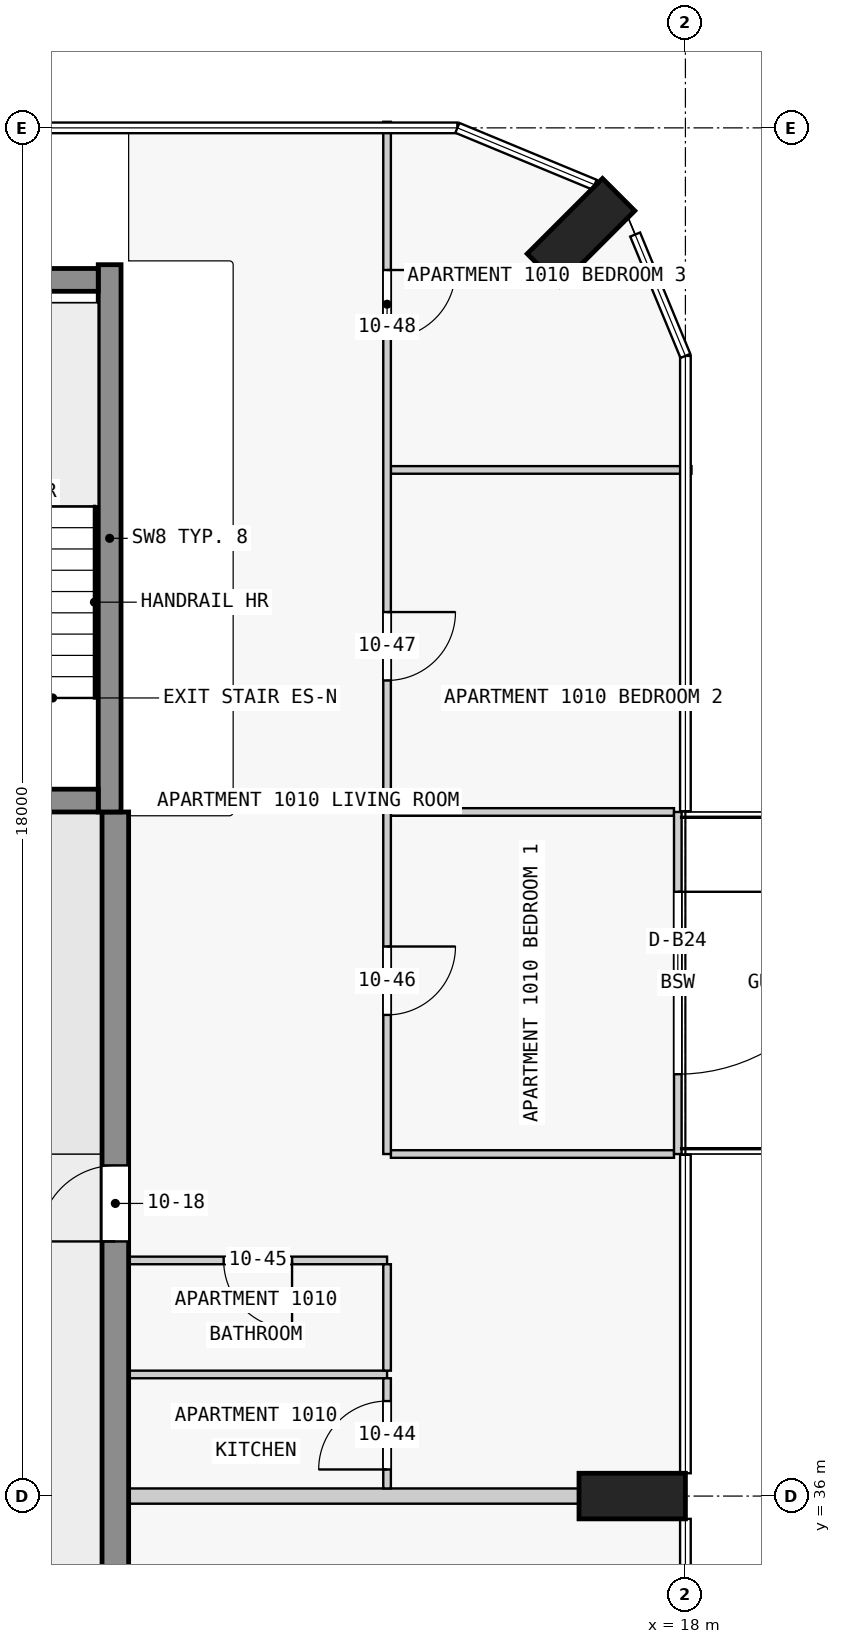
"""IFC4 building model, lengths in metres.
Left out: names, types, materials, properties, quantities, classifications, styles, units other than length and angle.
Written with IfcOpenShell. Run it as: python <this file> out.ifc"""

import sys

from ifc_helpers import new_model, si_unit, direction, frame, frame_2d, origin, origin_2d, place, context, subcontext, project, spatial, rectangle, extrude, element, fill, save


model = new_model("IFC4")
c1 = context("Model", 3, precision=1e-05, world=origin(), true_north=direction((0.0, 1.0)))
c2 = subcontext(c1, "Body", "Model", "MODEL_VIEW")
j1 = project(units=[si_unit("LENGTHUNIT", "METRE"), si_unit("PLANEANGLEUNIT", "RADIAN")], contexts=[c1])
p1 = place(None, origin())
s1 = spatial("IfcSite", under=j1, at=p1, CompositionType="ELEMENT")
p2 = place(p1, origin())
s2 = spatial("IfcBuilding", under=s1, at=p2, CompositionType="ELEMENT")
p3 = place(p2, frame((0.0, 0.0, 44.3)))
s3 = spatial("IfcBuildingStorey", under=s2, at=p3, CompositionType="ELEMENT", Elevation=44.3)
for number, where, z_axis, x_axis in (
    (1, (17.3, 36.0, 0.0), (0.0, 0.0, 1.0), (0.0, 1.0, 0.0)),
    (2, (16.626, 52.626, 0.0), (0.0, 0.0, 1.0), (-0.707, 0.707, 0.0)),
):
    element("IfcColumn", number, at=place(p3, frame(where, z_axis=z_axis, x_axis=x_axis)), inside=s3, PredefinedType="COLUMN", context=c2, shape_type="SweptSolid", body=[
        extrude(rectangle(XDim=0.6, YDim=1.4, at=origin_2d()), origin(), (0.0, 0.0, 1.0), 3.5),
    ])
p4 = place(p3, frame((7.725, 45.15, 0.0), z_axis=(0.0, 0.0, 1.0), x_axis=(1.0, 0.0, 0.0)))
e3 = element("IfcWall", 3, at=p4, inside=s3, PredefinedType="SHEAR", context=c2, shape_type="SweptSolid", body=[
    extrude(rectangle(XDim=2.55, YDim=0.3, at=frame_2d((1.275, 0.0))), origin(), (0.0, 0.0, 1.0), 3.5),
])
p5 = place(p4, frame((0.725, 0.0, 0.0)))
e4 = element("IfcOpeningElement", 4, at=p5, cuts=e3, PredefinedType="OPENING", context=c2, shape_type="SweptSolid", body=[
    extrude(rectangle(XDim=1.1, YDim=2.1, at=frame_2d((0.55, 1.05))), frame((0.0, 0.16, 0.0), z_axis=(0.0, -1.0, 0.0), x_axis=(1.0, 0.0, 0.0)), (0.0, 0.0, 1.0), 0.32),
])
p6 = place(p3, frame((7.725, 52.0, 0.0), z_axis=(0.0, 0.0, 1.0), x_axis=(1.0, 0.0, 0.0)))
e5 = element("IfcWall", 5, at=p6, inside=s3, PredefinedType="SHEAR", context=c2, shape_type="SweptSolid", body=[
    extrude(rectangle(XDim=2.55, YDim=0.3, at=frame_2d((1.275, 0.0))), origin(), (0.0, 0.0, 1.0), 3.5),
])
p7 = place(p3, frame((10.425, 45.0, 0.0), z_axis=(0.0, 0.0, 1.0), x_axis=(0.0, 1.0, 0.0)))
e6 = element("IfcWall", 6, at=p7, inside=s3, PredefinedType="SHEAR", context=c2, shape_type="SweptSolid", body=[
    extrude(rectangle(XDim=7.2, YDim=0.3, at=frame_2d((3.6, 0.0))), origin(), (0.0, 0.0, 1.0), 3.5),
])
p8 = place(p3, frame((10.5, 18.0, 0.0), z_axis=(0.0, 0.0, 1.0), x_axis=(0.0, 1.0, 0.0)))
e7 = element("IfcWall", 7, at=p8, inside=s3, PredefinedType="SHEAR", context=c2, shape_type="SweptSolid", body=[
    extrude(rectangle(XDim=27.0, YDim=0.35, at=frame_2d((13.5, 0.0))), origin(), (0.0, 0.0, 1.0), 3.25),
])
p9 = place(p8, frame((1.75, 0.0, 0.0)))
e8 = element("IfcOpeningElement", 8, at=p9, cuts=e7, PredefinedType="OPENING", context=c2, shape_type="SweptSolid", body=[
    extrude(rectangle(XDim=1.0, YDim=2.1, at=frame_2d((0.5, 1.05))), frame((0.0, 0.185, 0.0), z_axis=(0.0, -1.0, 0.0), x_axis=(1.0, 0.0, 0.0)), (0.0, 0.0, 1.0), 0.37),
])
p10 = place(p8, frame((6.25, 0.0, 0.0)))
e9 = element("IfcOpeningElement", 9, at=p10, cuts=e7, PredefinedType="OPENING", context=c2, shape_type="SweptSolid", body=[
    extrude(rectangle(XDim=1.0, YDim=2.1, at=frame_2d((0.5, 1.05))), frame((0.0, 0.185, 0.0), z_axis=(0.0, -1.0, 0.0), x_axis=(1.0, 0.0, 0.0)), (0.0, 0.0, 1.0), 0.37),
])
p11 = place(p8, frame((10.75, 0.0, 0.0)))
e10 = element("IfcOpeningElement", 10, at=p11, cuts=e7, PredefinedType="OPENING", context=c2, shape_type="SweptSolid", body=[
    extrude(rectangle(XDim=1.0, YDim=2.1, at=frame_2d((0.5, 1.05))), frame((0.0, 0.185, 0.0), z_axis=(0.0, -1.0, 0.0), x_axis=(1.0, 0.0, 0.0)), (0.0, 0.0, 1.0), 0.37),
])
p12 = place(p8, frame((15.25, 0.0, 0.0)))
e11 = element("IfcOpeningElement", 11, at=p12, cuts=e7, PredefinedType="OPENING", context=c2, shape_type="SweptSolid", body=[
    extrude(rectangle(XDim=1.0, YDim=2.1, at=frame_2d((0.5, 1.05))), frame((0.0, 0.185, 0.0), z_axis=(0.0, -1.0, 0.0), x_axis=(1.0, 0.0, 0.0)), (0.0, 0.0, 1.0), 0.37),
])
p13 = place(p8, frame((21.35, 0.0, 0.0)))
e12 = element("IfcOpeningElement", 12, at=p13, cuts=e7, PredefinedType="OPENING", context=c2, shape_type="SweptSolid", body=[
    extrude(rectangle(XDim=1.0, YDim=2.1, at=frame_2d((0.5, 1.05))), frame((0.0, 0.185, 0.0), z_axis=(0.0, -1.0, 0.0), x_axis=(1.0, 0.0, 0.0)), (0.0, 0.0, 1.0), 0.37),
])
p14 = place(p3, frame((17.9, 45.0, 0.0), z_axis=(0.0, 0.0, 1.0), x_axis=(0.0, -1.0, 0.0)))
e13 = element("IfcWall", 13, at=p14, inside=s3, PredefinedType="STANDARD", context=c2, shape_type="SweptSolid", body=[
    extrude(rectangle(XDim=4.5, YDim=0.1, at=frame_2d((2.25, 0.0))), origin(), (0.0, 0.0, 1.0), 3.25),
])
p15 = place(p14, frame((1.05, 0.0, 0.0)))
e14 = element("IfcOpeningElement", 14, at=p15, cuts=e13, PredefinedType="OPENING", context=c2, shape_type="SweptSolid", body=[
    extrude(rectangle(XDim=2.4, YDim=2.4, at=frame_2d((1.2, 1.2))), frame((0.0, 0.06, 0.0), z_axis=(0.0, -1.0, 0.0), x_axis=(1.0, 0.0, 0.0)), (0.0, 0.0, 1.0), 0.12),
])
p16 = place(p3, frame((16.6, 36.0, 0.0), z_axis=(0.0, 0.0, 1.0), x_axis=(-1.0, 0.0, 0.0)))
e15 = element("IfcWall", 15, at=p16, inside=s3, PredefinedType="PARTITIONING", context=c2, shape_type="SweptSolid", body=[
    extrude(rectangle(XDim=5.925, YDim=0.2, at=frame_2d((2.962, 0.0))), origin(), (0.0, 0.0, 1.0), 3.25),
])
p17 = place(p3, frame((14.075, 37.6, 0.0), z_axis=(0.0, 0.0, 1.0), x_axis=(-1.0, 0.0, 0.0)))
e16 = element("IfcWall", 16, at=p17, inside=s3, PredefinedType="PARTITIONING", context=c2, shape_type="SweptSolid", body=[
    extrude(rectangle(XDim=3.4, YDim=0.1, at=frame_2d((1.7, 0.0))), origin(), (0.0, 0.0, 1.0), 3.25),
])
p18 = place(p3, frame((14.075, 39.1, 0.0), z_axis=(0.0, 0.0, 1.0), x_axis=(-1.0, 0.0, 0.0)))
e17 = element("IfcWall", 17, at=p18, inside=s3, PredefinedType="PARTITIONING", context=c2, shape_type="SweptSolid", body=[
    extrude(rectangle(XDim=3.4, YDim=0.1, at=frame_2d((1.7, 0.0))), origin(), (0.0, 0.0, 1.0), 3.25),
])
p19 = place(p18, frame((1.25, 0.0, 0.0)))
e18 = element("IfcOpeningElement", 18, at=p19, cuts=e17, PredefinedType="OPENING", context=c2, shape_type="SweptSolid", body=[
    extrude(rectangle(XDim=0.9, YDim=2.1, at=frame_2d((0.45, 1.05))), frame((0.0, 0.06, 0.0), z_axis=(0.0, -1.0, 0.0), x_axis=(1.0, 0.0, 0.0)), (0.0, 0.0, 1.0), 0.12),
])
for number, where, z_axis, x_axis in (
    (19, (14.125, 40.5, 0.0), (0.0, 0.0, 1.0), (1.0, 0.0, 0.0)),
    (20, (17.85, 45.0, 0.0), (0.0, 0.0, 1.0), (-1.0, 0.0, 0.0)),
):
    element("IfcWall", number, at=place(p3, frame(where, z_axis=z_axis, x_axis=x_axis)), inside=s3, PredefinedType="PARTITIONING", context=c2, shape_type="SweptSolid", body=[
        extrude(rectangle(XDim=3.725, YDim=0.1, at=frame_2d((1.863, 0.0))), origin(), (0.0, 0.0, 1.0), 3.25),
    ])
p20 = place(p3, frame((18.08, 49.5, 0.0), z_axis=(0.0, 0.0, 1.0), x_axis=(-1.0, 0.0, 0.0)))
e21 = element("IfcWall", 21, at=p20, inside=s3, PredefinedType="PARTITIONING", context=c2, shape_type="SweptSolid", body=[
    extrude(rectangle(XDim=3.955, YDim=0.1, at=frame_2d((1.978, 0.0))), origin(), (0.0, 0.0, 1.0), 3.25),
])
p21 = place(p3, frame((14.075, 54.08, 0.0), z_axis=(0.0, 0.0, 1.0), x_axis=(0.0, -1.0, 0.0)))
e22 = element("IfcWall", 22, at=p21, inside=s3, PredefinedType="PARTITIONING", context=c2, shape_type="SweptSolid", body=[
    extrude(rectangle(XDim=13.58, YDim=0.1, at=frame_2d((6.79, 0.0))), origin(), (0.0, 0.0, 1.0), 3.25),
])
p22 = place(p21, frame((10.85, 0.0, 0.0)))
e23 = element("IfcOpeningElement", 23, at=p22, cuts=e22, PredefinedType="OPENING", context=c2, shape_type="SweptSolid", body=[
    extrude(rectangle(XDim=0.9, YDim=2.1, at=frame_2d((0.45, 1.05))), frame((0.0, 0.06, 0.0), z_axis=(0.0, -1.0, 0.0), x_axis=(1.0, 0.0, 0.0)), (0.0, 0.0, 1.0), 0.12),
])
p23 = place(p21, frame((6.45, 0.0, 0.0)))
e24 = element("IfcOpeningElement", 24, at=p23, cuts=e22, PredefinedType="OPENING", context=c2, shape_type="SweptSolid", body=[
    extrude(rectangle(XDim=0.9, YDim=2.1, at=frame_2d((0.45, 1.05))), frame((0.0, 0.06, 0.0), z_axis=(0.0, -1.0, 0.0), x_axis=(1.0, 0.0, 0.0)), (0.0, 0.0, 1.0), 0.12),
])
p24 = place(p21, frame((1.95, 0.0, 0.0)))
e25 = element("IfcOpeningElement", 25, at=p24, cuts=e22, PredefinedType="OPENING", context=c2, shape_type="SweptSolid", body=[
    extrude(rectangle(XDim=0.9, YDim=2.1, at=frame_2d((0.45, 1.05))), frame((0.0, 0.06, 0.0), z_axis=(0.0, -1.0, 0.0), x_axis=(1.0, 0.0, 0.0)), (0.0, 0.0, 1.0), 0.12),
])
p25 = place(p3, frame((14.075, 36.1, 0.0), z_axis=(0.0, 0.0, 1.0), x_axis=(0.0, 1.0, 0.0)))
e26 = element("IfcWall", 26, at=p25, inside=s3, PredefinedType="PARTITIONING", context=c2, shape_type="SweptSolid", body=[
    extrude(rectangle(XDim=1.45, YDim=0.1, at=frame_2d((0.725, 0.0))), origin(), (0.0, 0.0, 1.0), 3.25),
])
p26 = place(p25, frame((0.25, 0.0, 0.0)))
e27 = element("IfcOpeningElement", 27, at=p26, cuts=e26, PredefinedType="OPENING", context=c2, shape_type="SweptSolid", body=[
    extrude(rectangle(XDim=0.9, YDim=2.1, at=frame_2d((0.45, 1.05))), frame((0.0, 0.06, 0.0), z_axis=(0.0, -1.0, 0.0), x_axis=(1.0, 0.0, 0.0)), (0.0, 0.0, 1.0), 0.12),
])
p27 = place(p3, frame((14.075, 37.65, 0.0), z_axis=(0.0, 0.0, 1.0), x_axis=(0.0, 1.0, 0.0)))
e28 = element("IfcWall", 28, at=p27, inside=s3, PredefinedType="PARTITIONING", context=c2, shape_type="SweptSolid", body=[
    extrude(rectangle(XDim=1.4, YDim=0.1, at=frame_2d((0.7, 0.0))), origin(), (0.0, 0.0, 1.0), 3.25),
])
p28 = place(p15, origin())
e29 = element("IfcDoor", 29, at=p28, inside=s3, OperationType="SINGLE_SWING_LEFT", PredefinedType="DOOR", context=c2, shape_type="SweptSolid", body=[
    extrude(rectangle(XDim=2.4, YDim=2.4, at=frame_2d((1.2, 1.2))), frame((0.0, 0.025, 0.0), z_axis=(0.0, -1.0, 0.0), x_axis=(1.0, 0.0, 0.0)), (0.0, 0.0, 1.0), 0.05),
])
fill(e14, e29)
p29 = place(p13, origin())
e30 = element("IfcDoor", 30, at=p29, inside=s3, OperationType="SINGLE_SWING_RIGHT", PredefinedType="DOOR", context=c2, shape_type="SweptSolid", body=[
    extrude(rectangle(XDim=1.0, YDim=2.1, at=frame_2d((0.5, 1.05))), frame((0.0, 0.025, 0.0), z_axis=(0.0, -1.0, 0.0), x_axis=(1.0, 0.0, 0.0)), (0.0, 0.0, 1.0), 0.05),
])
fill(e12, e30)
p30 = place(p26, origin())
e31 = element("IfcDoor", 31, at=p30, inside=s3, OperationType="SINGLE_SWING_LEFT", PredefinedType="DOOR", context=c2, shape_type="SweptSolid", body=[
    extrude(rectangle(XDim=0.9, YDim=2.1, at=frame_2d((0.45, 1.05))), frame((0.0, 0.025, 0.0), z_axis=(0.0, -1.0, 0.0), x_axis=(1.0, 0.0, 0.0)), (0.0, 0.0, 1.0), 0.05),
])
fill(e27, e31)
p31 = place(p19, origin())
e32 = element("IfcDoor", 32, at=p31, inside=s3, OperationType="SINGLE_SWING_RIGHT", PredefinedType="DOOR", context=c2, shape_type="SweptSolid", body=[
    extrude(rectangle(XDim=0.9, YDim=2.1, at=frame_2d((0.45, 1.05))), frame((0.0, 0.025, 0.0), z_axis=(0.0, -1.0, 0.0), x_axis=(1.0, 0.0, 0.0)), (0.0, 0.0, 1.0), 0.05),
])
fill(e18, e32)
p32 = place(p22, origin())
e33 = element("IfcDoor", 33, at=p32, inside=s3, OperationType="SINGLE_SWING_RIGHT", PredefinedType="DOOR", context=c2, shape_type="SweptSolid", body=[
    extrude(rectangle(XDim=0.9, YDim=2.1, at=frame_2d((0.45, 1.05))), frame((0.0, 0.025, 0.0), z_axis=(0.0, -1.0, 0.0), x_axis=(1.0, 0.0, 0.0)), (0.0, 0.0, 1.0), 0.05),
])
fill(e23, e33)
p33 = place(p23, origin())
e34 = element("IfcDoor", 34, at=p33, inside=s3, OperationType="SINGLE_SWING_RIGHT", PredefinedType="DOOR", context=c2, shape_type="SweptSolid", body=[
    extrude(rectangle(XDim=0.9, YDim=2.1, at=frame_2d((0.45, 1.05))), frame((0.0, 0.025, 0.0), z_axis=(0.0, -1.0, 0.0), x_axis=(1.0, 0.0, 0.0)), (0.0, 0.0, 1.0), 0.05),
])
fill(e24, e34)
p34 = place(p24, origin())
e35 = element("IfcDoor", 35, at=p34, inside=s3, OperationType="SINGLE_SWING_LEFT", PredefinedType="DOOR", context=c2, shape_type="SweptSolid", body=[
    extrude(rectangle(XDim=0.9, YDim=2.1, at=frame_2d((0.45, 1.05))), frame((0.0, 0.025, 0.0), z_axis=(0.0, -1.0, 0.0), x_axis=(1.0, 0.0, 0.0)), (0.0, 0.0, 1.0), 0.05),
])
fill(e25, e35)
save(model, sys.argv[1])
